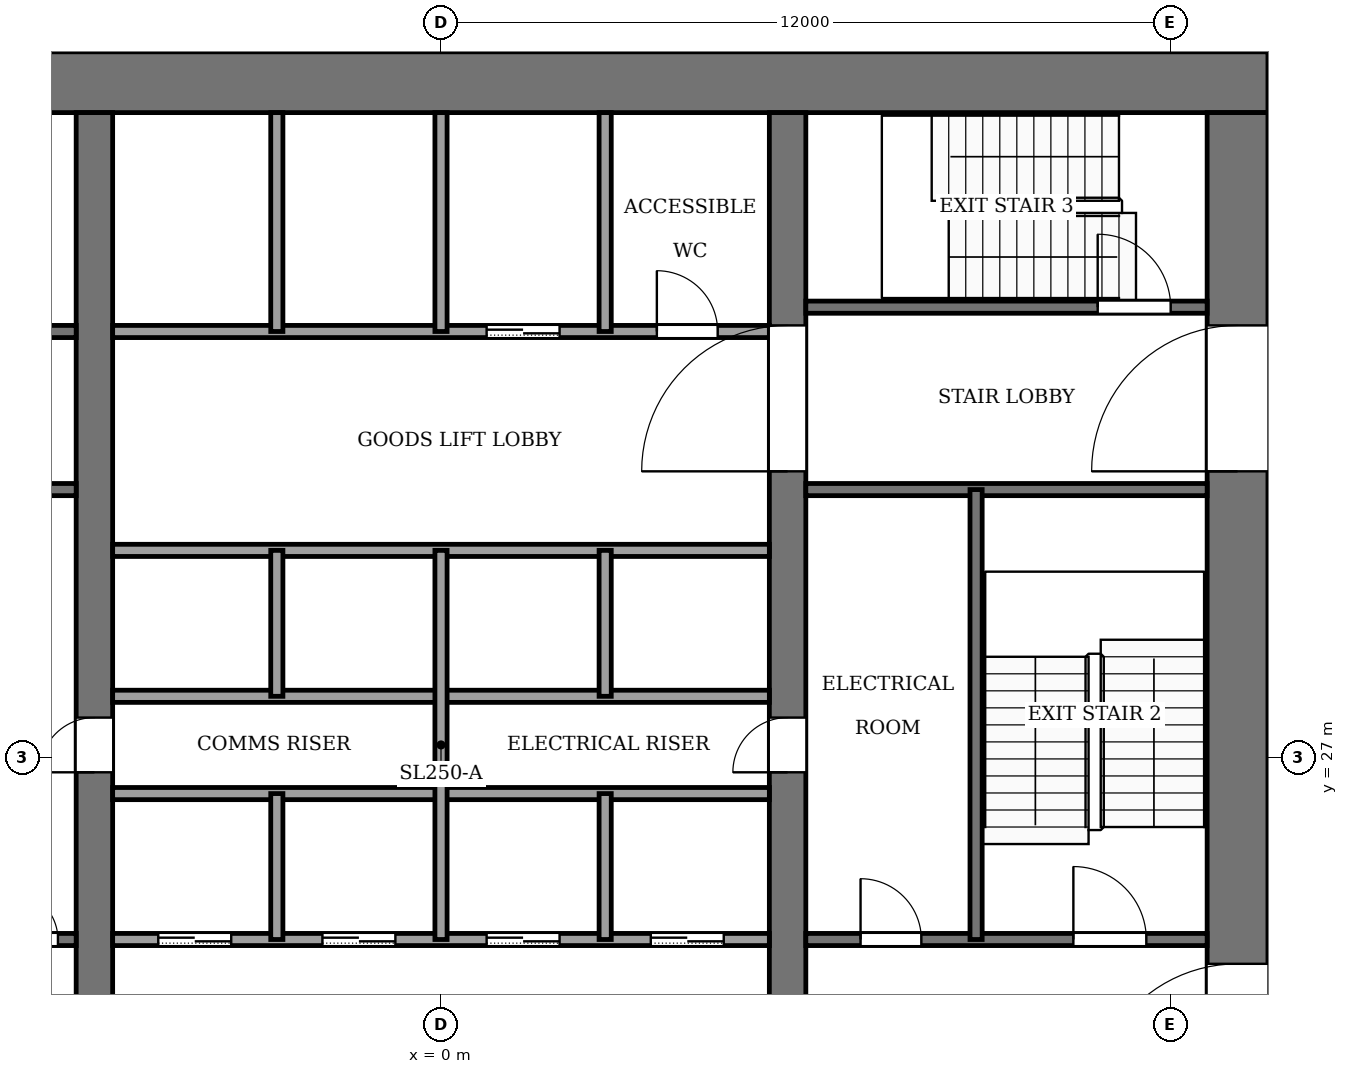
"""IFC4 building model, lengths in metres.
Left out: names, types, materials, properties, quantities, classifications, styles, units other than length and angle.
Written with IfcOpenShell. Run it as: python <this file> out.ifc"""

import sys

from ifc_helpers import new_model, si_unit, direction, frame, frame_2d, origin, place, context, subcontext, project, spatial, rectangle, extrude, element, fill, save


model = new_model("IFC4")
c1 = context("Model", 3, precision=1e-05, world=origin(), true_north=direction((0.0, 1.0)))
c2 = subcontext(c1, "Body", "Model", "MODEL_VIEW")
j1 = project(units=[si_unit("LENGTHUNIT", "METRE"), si_unit("PLANEANGLEUNIT", "RADIAN")], contexts=[c1])
p1 = place(None, origin())
s1 = spatial("IfcSite", under=j1, at=p1, CompositionType="ELEMENT")
p2 = place(p1, origin())
s2 = spatial("IfcBuilding", under=s1, at=p2, CompositionType="ELEMENT")
p3 = place(p2, frame((0.0, 0.0, 162.0)))
s3 = spatial("IfcBuildingStorey", under=s2, at=p3, CompositionType="ELEMENT", Elevation=162.0)
p4 = place(p3, frame((-13.6, 38.1, -0.13), z_axis=(0.0, 0.0, 1.0), x_axis=(1.0, 0.0, 0.0)))
e1 = element("IfcWall", 1, at=p4, inside=s3, PredefinedType="SHEAR", context=c2, shape_type="SweptSolid", body=[
    extrude(rectangle(XDim=27.2, YDim=1.0, at=frame_2d((13.6, 0.0))), origin(), (0.0, 0.0, 1.0), 4.0),
])
p5 = place(p3, frame((13.1, 18.4, -0.13), z_axis=(0.0, 0.0, 1.0), x_axis=(0.0, 1.0, 0.0)))
e2 = element("IfcWall", 2, at=p5, inside=s3, PredefinedType="SHEAR", context=c2, shape_type="SweptSolid", body=[
    extrude(rectangle(XDim=19.2, YDim=1.0, at=frame_2d((9.6, 0.0))), origin(), (0.0, 0.0, 1.0), 4.0),
])
p6 = place(p5, frame((2.8, 0.0, 0.13)))
e3 = element("IfcOpeningElement", 3, at=p6, cuts=e2, PredefinedType="OPENING", context=c2, shape_type="SweptSolid", body=[
    extrude(rectangle(XDim=2.4, YDim=2.4, at=frame_2d((1.2, 1.2))), frame((0.0, 0.51, 0.0), z_axis=(0.0, -1.0, 0.0), x_axis=(1.0, 0.0, 0.0)), (0.0, 0.0, 1.0), 1.02),
])
p7 = place(p5, frame((13.3, 0.0, 0.13)))
e4 = element("IfcOpeningElement", 4, at=p7, cuts=e2, PredefinedType="OPENING", context=c2, shape_type="SweptSolid", body=[
    extrude(rectangle(XDim=2.4, YDim=2.4, at=frame_2d((1.2, 1.2))), frame((0.0, 0.51, 0.0), z_axis=(0.0, -1.0, 0.0), x_axis=(1.0, 0.0, 0.0)), (0.0, 0.0, 1.0), 1.02),
])
p8 = place(p3, frame((-5.7, 18.4, -0.13), z_axis=(0.0, 0.0, 1.0), x_axis=(0.0, 1.0, 0.0)))
e5 = element("IfcWall", 5, at=p8, inside=s3, PredefinedType="SHEAR", context=c2, shape_type="SweptSolid", body=[
    extrude(rectangle(XDim=19.2, YDim=0.6, at=frame_2d((9.6, 0.0))), origin(), (0.0, 0.0, 1.0), 4.0),
])
p9 = place(p8, frame((8.35, 0.0, 0.13)))
e6 = element("IfcOpeningElement", 6, at=p9, cuts=e5, PredefinedType="OPENING", context=c2, shape_type="SweptSolid", body=[
    extrude(rectangle(XDim=0.9, YDim=2.1, at=frame_2d((0.45, 1.05))), frame((0.0, 0.31, 0.0), z_axis=(0.0, -1.0, 0.0), x_axis=(1.0, 0.0, 0.0)), (0.0, 0.0, 1.0), 0.62),
])
p10 = place(p3, frame((5.7, 18.4, -0.13), z_axis=(0.0, 0.0, 1.0), x_axis=(0.0, 1.0, 0.0)))
e7 = element("IfcWall", 7, at=p10, inside=s3, PredefinedType="SHEAR", context=c2, shape_type="SweptSolid", body=[
    extrude(rectangle(XDim=19.2, YDim=0.6, at=frame_2d((9.6, 0.0))), origin(), (0.0, 0.0, 1.0), 4.0),
])
p11 = place(p10, frame((8.35, 0.0, 0.13)))
e8 = element("IfcOpeningElement", 8, at=p11, cuts=e7, PredefinedType="OPENING", context=c2, shape_type="SweptSolid", body=[
    extrude(rectangle(XDim=0.9, YDim=2.1, at=frame_2d((0.45, 1.05))), frame((0.0, 0.31, 0.0), z_axis=(0.0, -1.0, 0.0), x_axis=(1.0, 0.0, 0.0)), (0.0, 0.0, 1.0), 0.62),
])
p12 = place(p10, frame((13.3, 0.0, 0.13)))
e9 = element("IfcOpeningElement", 9, at=p12, cuts=e7, PredefinedType="OPENING", context=c2, shape_type="SweptSolid", body=[
    extrude(rectangle(XDim=2.4, YDim=2.4, at=frame_2d((1.2, 1.2))), frame((0.0, 0.31, 0.0), z_axis=(0.0, -1.0, 0.0), x_axis=(1.0, 0.0, 0.0)), (0.0, 0.0, 1.0), 0.62),
])
p13 = place(p3, frame((-12.6, 24.0, 0.0), z_axis=(0.0, 0.0, 1.0), x_axis=(1.0, 0.0, 0.0)))
e10 = element("IfcWall", 10, at=p13, inside=s3, PredefinedType="PARTITIONING", context=c2, shape_type="SweptSolid", body=[
    extrude(rectangle(XDim=6.6, YDim=0.2, at=frame_2d((3.3, 0.0))), origin(), (0.0, 0.0, 1.0), 3.87),
])
p14 = place(p13, frame((4.1, 0.0, 0.0)))
e11 = element("IfcOpeningElement", 11, at=p14, cuts=e10, PredefinedType="OPENING", context=c2, shape_type="SweptSolid", body=[
    extrude(rectangle(XDim=0.8, YDim=2.1, at=frame_2d((0.4, 1.05))), frame((0.0, 0.11, 0.0), z_axis=(0.0, -1.0, 0.0), x_axis=(1.0, 0.0, 0.0)), (0.0, 0.0, 1.0), 0.22),
])
p15 = place(p13, frame((5.5, 0.0, 0.0)))
e12 = element("IfcOpeningElement", 12, at=p15, cuts=e10, PredefinedType="OPENING", context=c2, shape_type="SweptSolid", body=[
    extrude(rectangle(XDim=0.8, YDim=2.1, at=frame_2d((0.4, 1.05))), frame((0.0, 0.11, 0.0), z_axis=(0.0, -1.0, 0.0), x_axis=(1.0, 0.0, 0.0)), (0.0, 0.0, 1.0), 0.22),
])
p16 = place(p3, frame((-5.4, 24.0, 0.0), z_axis=(0.0, 0.0, 1.0), x_axis=(1.0, 0.0, 0.0)))
e13 = element("IfcWall", 13, at=p16, inside=s3, PredefinedType="PARTITIONING", context=c2, shape_type="SweptSolid", body=[
    extrude(rectangle(XDim=10.8, YDim=0.2, at=frame_2d((5.4, 0.0))), origin(), (0.0, 0.0, 1.0), 3.87),
])
p17 = place(p16, frame((0.75, 0.0, 0.0)))
e14 = element("IfcOpeningElement", 14, at=p17, cuts=e13, PredefinedType="OPENING", context=c2, shape_type="SweptSolid", body=[
    extrude(rectangle(XDim=1.2, YDim=2.2, at=frame_2d((0.6, 1.1))), frame((0.0, 0.11, 0.0), z_axis=(0.0, -1.0, 0.0), x_axis=(1.0, 0.0, 0.0)), (0.0, 0.0, 1.0), 0.22),
])
p18 = place(p16, frame((3.45, 0.0, 0.0)))
e15 = element("IfcOpeningElement", 15, at=p18, cuts=e13, PredefinedType="OPENING", context=c2, shape_type="SweptSolid", body=[
    extrude(rectangle(XDim=1.2, YDim=2.2, at=frame_2d((0.6, 1.1))), frame((0.0, 0.11, 0.0), z_axis=(0.0, -1.0, 0.0), x_axis=(1.0, 0.0, 0.0)), (0.0, 0.0, 1.0), 0.22),
])
p19 = place(p16, frame((6.15, 0.0, 0.0)))
e16 = element("IfcOpeningElement", 16, at=p19, cuts=e13, PredefinedType="OPENING", context=c2, shape_type="SweptSolid", body=[
    extrude(rectangle(XDim=1.2, YDim=2.2, at=frame_2d((0.6, 1.1))), frame((0.0, 0.11, 0.0), z_axis=(0.0, -1.0, 0.0), x_axis=(1.0, 0.0, 0.0)), (0.0, 0.0, 1.0), 0.22),
])
p20 = place(p16, frame((8.85, 0.0, 0.0)))
e17 = element("IfcOpeningElement", 17, at=p20, cuts=e13, PredefinedType="OPENING", context=c2, shape_type="SweptSolid", body=[
    extrude(rectangle(XDim=1.2, YDim=2.2, at=frame_2d((0.6, 1.1))), frame((0.0, 0.11, 0.0), z_axis=(0.0, -1.0, 0.0), x_axis=(1.0, 0.0, 0.0)), (0.0, 0.0, 1.0), 0.22),
])
p21 = place(p3, frame((6.0, 24.0, 0.0), z_axis=(0.0, 0.0, 1.0), x_axis=(1.0, 0.0, 0.0)))
e18 = element("IfcWall", 18, at=p21, inside=s3, PredefinedType="PARTITIONING", context=c2, shape_type="SweptSolid", body=[
    extrude(rectangle(XDim=6.6, YDim=0.2, at=frame_2d((3.3, 0.0))), origin(), (0.0, 0.0, 1.0), 3.87),
])
p22 = place(p21, frame((0.9, 0.0, 0.0)))
e19 = element("IfcOpeningElement", 19, at=p22, cuts=e18, PredefinedType="OPENING", context=c2, shape_type="SweptSolid", body=[
    extrude(rectangle(XDim=1.0, YDim=2.1, at=frame_2d((0.5, 1.05))), frame((0.0, 0.11, 0.0), z_axis=(0.0, -1.0, 0.0), x_axis=(1.0, 0.0, 0.0)), (0.0, 0.0, 1.0), 0.22),
])
p23 = place(p21, frame((4.4, 0.0, 0.0)))
e20 = element("IfcOpeningElement", 20, at=p23, cuts=e18, PredefinedType="OPENING", context=c2, shape_type="SweptSolid", body=[
    extrude(rectangle(XDim=1.2, YDim=2.2, at=frame_2d((0.6, 1.1))), frame((0.0, 0.11, 0.0), z_axis=(0.0, -1.0, 0.0), x_axis=(1.0, 0.0, 0.0)), (0.0, 0.0, 1.0), 0.22),
])
for number, where, z_axis, x_axis in (
    (21, (-5.4, 26.4, 0.0), (0.0, 0.0, 1.0), (1.0, 0.0, 0.0)),
    (22, (-5.4, 28.0, 0.0), (0.0, 0.0, 1.0), (1.0, 0.0, 0.0)),
    (23, (-5.4, 30.4, 0.0), (0.0, 0.0, 1.0), (1.0, 0.0, 0.0)),
):
    element("IfcWall", number, at=place(p3, frame(where, z_axis=z_axis, x_axis=x_axis)), inside=s3, PredefinedType="PARTITIONING", context=c2, shape_type="SweptSolid", body=[
        extrude(rectangle(XDim=10.8, YDim=0.2, at=frame_2d((5.4, 0.0))), origin(), (0.0, 0.0, 1.0), 3.87),
    ])
p24 = place(p3, frame((-12.6, 31.4, 0.0), z_axis=(0.0, 0.0, 1.0), x_axis=(1.0, 0.0, 0.0)))
e24 = element("IfcWall", 24, at=p24, inside=s3, PredefinedType="PARTITIONING", context=c2, shape_type="SweptSolid", body=[
    extrude(rectangle(XDim=6.6, YDim=0.2, at=frame_2d((3.3, 0.0))), origin(), (0.0, 0.0, 1.0), 3.87),
])
p25 = place(p24, frame((1.0, 0.0, 0.0)))
e25 = element("IfcOpeningElement", 25, at=p25, cuts=e24, PredefinedType="OPENING", context=c2, shape_type="SweptSolid", body=[
    extrude(rectangle(XDim=1.2, YDim=2.2, at=frame_2d((0.6, 1.1))), frame((0.0, 0.11, 0.0), z_axis=(0.0, -1.0, 0.0), x_axis=(1.0, 0.0, 0.0)), (0.0, 0.0, 1.0), 0.22),
])
p26 = place(p3, frame((6.0, 31.4, 0.0), z_axis=(0.0, 0.0, 1.0), x_axis=(1.0, 0.0, 0.0)))
e26 = element("IfcWall", 26, at=p26, inside=s3, PredefinedType="PARTITIONING", context=c2, shape_type="SweptSolid", body=[
    extrude(rectangle(XDim=6.6, YDim=0.2, at=frame_2d((3.3, 0.0))), origin(), (0.0, 0.0, 1.0), 3.87),
])
p27 = place(p3, frame((-12.6, 34.0, 0.0), z_axis=(0.0, 0.0, 1.0), x_axis=(1.0, 0.0, 0.0)))
e27 = element("IfcWall", 27, at=p27, inside=s3, PredefinedType="PARTITIONING", context=c2, shape_type="SweptSolid", body=[
    extrude(rectangle(XDim=6.6, YDim=0.2, at=frame_2d((3.3, 0.0))), origin(), (0.0, 0.0, 1.0), 3.87),
])
p28 = place(p27, frame((4.7, 0.0, 0.0)))
e28 = element("IfcOpeningElement", 28, at=p28, cuts=e27, PredefinedType="OPENING", context=c2, shape_type="SweptSolid", body=[
    extrude(rectangle(XDim=1.4, YDim=2.2, at=frame_2d((0.7, 1.1))), frame((0.0, 0.11, 0.0), z_axis=(0.0, -1.0, 0.0), x_axis=(1.0, 0.0, 0.0)), (0.0, 0.0, 1.0), 0.22),
])
p29 = place(p27, frame((2.3, 0.0, 0.0)))
e29 = element("IfcOpeningElement", 29, at=p29, cuts=e27, PredefinedType="OPENING", context=c2, shape_type="SweptSolid", body=[
    extrude(rectangle(XDim=1.4, YDim=2.2, at=frame_2d((0.7, 1.1))), frame((0.0, 0.11, 0.0), z_axis=(0.0, -1.0, 0.0), x_axis=(1.0, 0.0, 0.0)), (0.0, 0.0, 1.0), 0.22),
])
p30 = place(p27, frame((0.45, 0.0, 0.0)))
e30 = element("IfcOpeningElement", 30, at=p30, cuts=e27, PredefinedType="OPENING", context=c2, shape_type="SweptSolid", body=[
    extrude(rectangle(XDim=0.9, YDim=2.1, at=frame_2d((0.45, 1.05))), frame((0.0, 0.11, 0.0), z_axis=(0.0, -1.0, 0.0), x_axis=(1.0, 0.0, 0.0)), (0.0, 0.0, 1.0), 0.22),
])
p31 = place(p3, frame((-5.4, 34.0, 0.0), z_axis=(0.0, 0.0, 1.0), x_axis=(1.0, 0.0, 0.0)))
e31 = element("IfcWall", 31, at=p31, inside=s3, PredefinedType="PARTITIONING", context=c2, shape_type="SweptSolid", body=[
    extrude(rectangle(XDim=10.8, YDim=0.2, at=frame_2d((5.4, 0.0))), origin(), (0.0, 0.0, 1.0), 3.87),
])
p32 = place(p31, frame((6.15, 0.0, 0.0)))
e32 = element("IfcOpeningElement", 32, at=p32, cuts=e31, PredefinedType="OPENING", context=c2, shape_type="SweptSolid", body=[
    extrude(rectangle(XDim=1.2, YDim=2.2, at=frame_2d((0.6, 1.1))), frame((0.0, 0.11, 0.0), z_axis=(0.0, -1.0, 0.0), x_axis=(1.0, 0.0, 0.0)), (0.0, 0.0, 1.0), 0.22),
])
p33 = place(p31, frame((8.95, 0.0, 0.0)))
e33 = element("IfcOpeningElement", 33, at=p33, cuts=e31, PredefinedType="OPENING", context=c2, shape_type="SweptSolid", body=[
    extrude(rectangle(XDim=1.0, YDim=2.1, at=frame_2d((0.5, 1.05))), frame((0.0, 0.11, 0.0), z_axis=(0.0, -1.0, 0.0), x_axis=(1.0, 0.0, 0.0)), (0.0, 0.0, 1.0), 0.22),
])
p34 = place(p3, frame((6.0, 34.4, 0.0), z_axis=(0.0, 0.0, 1.0), x_axis=(1.0, 0.0, 0.0)))
e34 = element("IfcWall", 34, at=p34, inside=s3, PredefinedType="PARTITIONING", context=c2, shape_type="SweptSolid", body=[
    extrude(rectangle(XDim=6.6, YDim=0.2, at=frame_2d((3.3, 0.0))), origin(), (0.0, 0.0, 1.0), 3.87),
])
p35 = place(p34, frame((4.8, 0.0, 0.0)))
e35 = element("IfcOpeningElement", 35, at=p35, cuts=e34, PredefinedType="OPENING", context=c2, shape_type="SweptSolid", body=[
    extrude(rectangle(XDim=1.2, YDim=2.2, at=frame_2d((0.6, 1.1))), frame((0.0, 0.11, 0.0), z_axis=(0.0, -1.0, 0.0), x_axis=(1.0, 0.0, 0.0)), (0.0, 0.0, 1.0), 0.22),
])
for number, where, z_axis, x_axis in (
    (36, (-2.7, 24.0, 0.0), (0.0, 0.0, 1.0), (0.0, 1.0, 0.0)),
    (37, (-2.7, 28.0, 0.0), (0.0, 0.0, 1.0), (0.0, 1.0, 0.0)),
):
    element("IfcWall", number, at=place(p3, frame(where, z_axis=z_axis, x_axis=x_axis)), inside=s3, PredefinedType="PARTITIONING", context=c2, shape_type="SweptSolid", body=[
        extrude(rectangle(XDim=2.4, YDim=0.2, at=frame_2d((1.2, 0.0))), origin(), (0.0, 0.0, 1.0), 3.87),
    ])
p36 = place(p3, frame((-2.7, 34.0, 0.0), z_axis=(0.0, 0.0, 1.0), x_axis=(0.0, 1.0, 0.0)))
e38 = element("IfcWall", 38, at=p36, inside=s3, PredefinedType="PARTITIONING", context=c2, shape_type="SweptSolid", body=[
    extrude(rectangle(XDim=3.6, YDim=0.2, at=frame_2d((1.8, 0.0))), origin(), (0.0, 0.0, 1.0), 3.87),
])
p37 = place(p3, frame((0.0, 24.0, 0.0), z_axis=(0.0, 0.0, 1.0), x_axis=(0.0, 1.0, 0.0)))
e39 = element("IfcWall", 39, at=p37, inside=s3, PredefinedType="PARTITIONING", context=c2, shape_type="SweptSolid", body=[
    extrude(rectangle(XDim=6.4, YDim=0.2, at=frame_2d((3.2, 0.0))), origin(), (0.0, 0.0, 1.0), 3.87),
])
p38 = place(p3, frame((0.0, 34.0, 0.0), z_axis=(0.0, 0.0, 1.0), x_axis=(0.0, 1.0, 0.0)))
e40 = element("IfcWall", 40, at=p38, inside=s3, PredefinedType="PARTITIONING", context=c2, shape_type="SweptSolid", body=[
    extrude(rectangle(XDim=3.6, YDim=0.2, at=frame_2d((1.8, 0.0))), origin(), (0.0, 0.0, 1.0), 3.87),
])
for number, where, z_axis, x_axis in (
    (41, (2.7, 24.0, 0.0), (0.0, 0.0, 1.0), (0.0, 1.0, 0.0)),
    (42, (2.7, 28.0, 0.0), (0.0, 0.0, 1.0), (0.0, 1.0, 0.0)),
):
    element("IfcWall", number, at=place(p3, frame(where, z_axis=z_axis, x_axis=x_axis)), inside=s3, PredefinedType="PARTITIONING", context=c2, shape_type="SweptSolid", body=[
        extrude(rectangle(XDim=2.4, YDim=0.2, at=frame_2d((1.2, 0.0))), origin(), (0.0, 0.0, 1.0), 3.87),
    ])
p39 = place(p3, frame((2.7, 34.0, 0.0), z_axis=(0.0, 0.0, 1.0), x_axis=(0.0, 1.0, 0.0)))
e43 = element("IfcWall", 43, at=p39, inside=s3, PredefinedType="PARTITIONING", context=c2, shape_type="SweptSolid", body=[
    extrude(rectangle(XDim=3.6, YDim=0.2, at=frame_2d((1.8, 0.0))), origin(), (0.0, 0.0, 1.0), 3.87),
])
p40 = place(p3, frame((8.8, 24.0, 0.0), z_axis=(0.0, 0.0, 1.0), x_axis=(0.0, 1.0, 0.0)))
e44 = element("IfcWall", 44, at=p40, inside=s3, PredefinedType="PARTITIONING", context=c2, shape_type="SweptSolid", body=[
    extrude(rectangle(XDim=7.4, YDim=0.2, at=frame_2d((3.7, 0.0))), origin(), (0.0, 0.0, 1.0), 3.87),
])
p41 = place(p17, origin())
e45 = element("IfcDoor", 45, at=p41, inside=s3, OperationType="SLIDING_TO_LEFT", PredefinedType="DOOR", context=c2, shape_type="SweptSolid", body=[
    extrude(rectangle(XDim=1.2, YDim=2.2, at=frame_2d((0.6, 1.1))), frame((0.0, 0.025, 0.0), z_axis=(0.0, -1.0, 0.0), x_axis=(1.0, 0.0, 0.0)), (0.0, 0.0, 1.0), 0.05),
])
fill(e14, e45)
p42 = place(p18, origin())
e46 = element("IfcDoor", 46, at=p42, inside=s3, OperationType="SLIDING_TO_LEFT", PredefinedType="DOOR", context=c2, shape_type="SweptSolid", body=[
    extrude(rectangle(XDim=1.2, YDim=2.2, at=frame_2d((0.6, 1.1))), frame((0.0, 0.025, 0.0), z_axis=(0.0, -1.0, 0.0), x_axis=(1.0, 0.0, 0.0)), (0.0, 0.0, 1.0), 0.05),
])
fill(e15, e46)
p43 = place(p19, origin())
e47 = element("IfcDoor", 47, at=p43, inside=s3, OperationType="SLIDING_TO_LEFT", PredefinedType="DOOR", context=c2, shape_type="SweptSolid", body=[
    extrude(rectangle(XDim=1.2, YDim=2.2, at=frame_2d((0.6, 1.1))), frame((0.0, 0.025, 0.0), z_axis=(0.0, -1.0, 0.0), x_axis=(1.0, 0.0, 0.0)), (0.0, 0.0, 1.0), 0.05),
])
fill(e16, e47)
p44 = place(p20, origin())
e48 = element("IfcDoor", 48, at=p44, inside=s3, OperationType="SLIDING_TO_LEFT", PredefinedType="DOOR", context=c2, shape_type="SweptSolid", body=[
    extrude(rectangle(XDim=1.2, YDim=2.2, at=frame_2d((0.6, 1.1))), frame((0.0, 0.025, 0.0), z_axis=(0.0, -1.0, 0.0), x_axis=(1.0, 0.0, 0.0)), (0.0, 0.0, 1.0), 0.05),
])
fill(e17, e48)
p45 = place(p32, origin())
e49 = element("IfcDoor", 49, at=p45, inside=s3, OperationType="SLIDING_TO_LEFT", PredefinedType="DOOR", context=c2, shape_type="SweptSolid", body=[
    extrude(rectangle(XDim=1.2, YDim=2.2, at=frame_2d((0.6, 1.1))), frame((0.0, 0.025, 0.0), z_axis=(0.0, -1.0, 0.0), x_axis=(1.0, 0.0, 0.0)), (0.0, 0.0, 1.0), 0.05),
])
fill(e32, e49)
p46 = place(p15, origin())
e50 = element("IfcDoor", 50, at=p46, inside=s3, OperationType="SINGLE_SWING_RIGHT", PredefinedType="DOOR", context=c2, shape_type="SweptSolid", body=[
    extrude(rectangle(XDim=0.8, YDim=2.1, at=frame_2d((0.4, 1.05))), frame((0.0, 0.025, 0.0), z_axis=(0.0, -1.0, 0.0), x_axis=(1.0, 0.0, 0.0)), (0.0, 0.0, 1.0), 0.05),
])
fill(e12, e50)
p47 = place(p22, origin())
e51 = element("IfcDoor", 51, at=p47, inside=s3, OperationType="SINGLE_SWING_RIGHT", PredefinedType="DOOR", context=c2, shape_type="SweptSolid", body=[
    extrude(rectangle(XDim=1.0, YDim=2.1, at=frame_2d((0.5, 1.05))), frame((0.0, 0.025, 0.0), z_axis=(0.0, -1.0, 0.0), x_axis=(1.0, 0.0, 0.0)), (0.0, 0.0, 1.0), 0.05),
])
fill(e19, e51)
p48 = place(p33, origin())
e52 = element("IfcDoor", 52, at=p48, inside=s3, OperationType="SINGLE_SWING_LEFT", PredefinedType="DOOR", context=c2, shape_type="SweptSolid", body=[
    extrude(rectangle(XDim=1.0, YDim=2.1, at=frame_2d((0.5, 1.05))), frame((0.0, 0.025, 0.0), z_axis=(0.0, -1.0, 0.0), x_axis=(1.0, 0.0, 0.0)), (0.0, 0.0, 1.0), 0.05),
])
fill(e33, e52)
p49 = place(p9, origin())
e53 = element("IfcDoor", 53, at=p49, inside=s3, OperationType="SINGLE_SWING_LEFT", PredefinedType="DOOR", context=c2, shape_type="SweptSolid", body=[
    extrude(rectangle(XDim=0.9, YDim=2.1, at=frame_2d((0.45, 1.05))), frame((0.0, 0.025, 0.0), z_axis=(0.0, -1.0, 0.0), x_axis=(1.0, 0.0, 0.0)), (0.0, 0.0, 1.0), 0.05),
])
fill(e6, e53)
p50 = place(p11, origin())
e54 = element("IfcDoor", 54, at=p50, inside=s3, OperationType="SINGLE_SWING_RIGHT", PredefinedType="DOOR", context=c2, shape_type="SweptSolid", body=[
    extrude(rectangle(XDim=0.9, YDim=2.1, at=frame_2d((0.45, 1.05))), frame((0.0, 0.025, 0.0), z_axis=(0.0, -1.0, 0.0), x_axis=(1.0, 0.0, 0.0)), (0.0, 0.0, 1.0), 0.05),
])
fill(e8, e54)
p51 = place(p23, origin())
e55 = element("IfcDoor", 55, at=p51, inside=s3, OperationType="SINGLE_SWING_LEFT", PredefinedType="DOOR", context=c2, shape_type="SweptSolid", body=[
    extrude(rectangle(XDim=1.2, YDim=2.2, at=frame_2d((0.6, 1.1))), frame((0.0, 0.025, 0.0), z_axis=(0.0, -1.0, 0.0), x_axis=(1.0, 0.0, 0.0)), (0.0, 0.0, 1.0), 0.05),
])
fill(e20, e55)
p52 = place(p35, origin())
e56 = element("IfcDoor", 56, at=p52, inside=s3, OperationType="SINGLE_SWING_RIGHT", PredefinedType="DOOR", context=c2, shape_type="SweptSolid", body=[
    extrude(rectangle(XDim=1.2, YDim=2.2, at=frame_2d((0.6, 1.1))), frame((0.0, 0.025, 0.0), z_axis=(0.0, -1.0, 0.0), x_axis=(1.0, 0.0, 0.0)), (0.0, 0.0, 1.0), 0.05),
])
fill(e35, e56)
p53 = place(p12, origin())
e57 = element("IfcDoor", 57, at=p53, inside=s3, OperationType="DOUBLE_DOOR_SINGLE_SWING", PredefinedType="DOOR", context=c2, shape_type="SweptSolid", body=[
    extrude(rectangle(XDim=2.4, YDim=2.4, at=frame_2d((1.2, 1.2))), frame((0.0, 0.025, 0.0), z_axis=(0.0, -1.0, 0.0), x_axis=(1.0, 0.0, 0.0)), (0.0, 0.0, 1.0), 0.05),
])
fill(e9, e57)
p54 = place(p6, origin())
e58 = element("IfcDoor", 58, at=p54, inside=s3, OperationType="DOUBLE_DOOR_SINGLE_SWING", PredefinedType="DOOR", context=c2, shape_type="SweptSolid", body=[
    extrude(rectangle(XDim=2.4, YDim=2.4, at=frame_2d((1.2, 1.2))), frame((0.0, 0.025, 0.0), z_axis=(0.0, -1.0, 0.0), x_axis=(1.0, 0.0, 0.0)), (0.0, 0.0, 1.0), 0.05),
])
fill(e3, e58)
p55 = place(p7, origin())
e59 = element("IfcDoor", 59, at=p55, inside=s3, OperationType="DOUBLE_DOOR_SINGLE_SWING", PredefinedType="DOOR", context=c2, shape_type="SweptSolid", body=[
    extrude(rectangle(XDim=2.4, YDim=2.4, at=frame_2d((1.2, 1.2))), frame((0.0, 0.025, 0.0), z_axis=(0.0, -1.0, 0.0), x_axis=(1.0, 0.0, 0.0)), (0.0, 0.0, 1.0), 0.05),
])
fill(e4, e59)
save(model, sys.argv[1])
